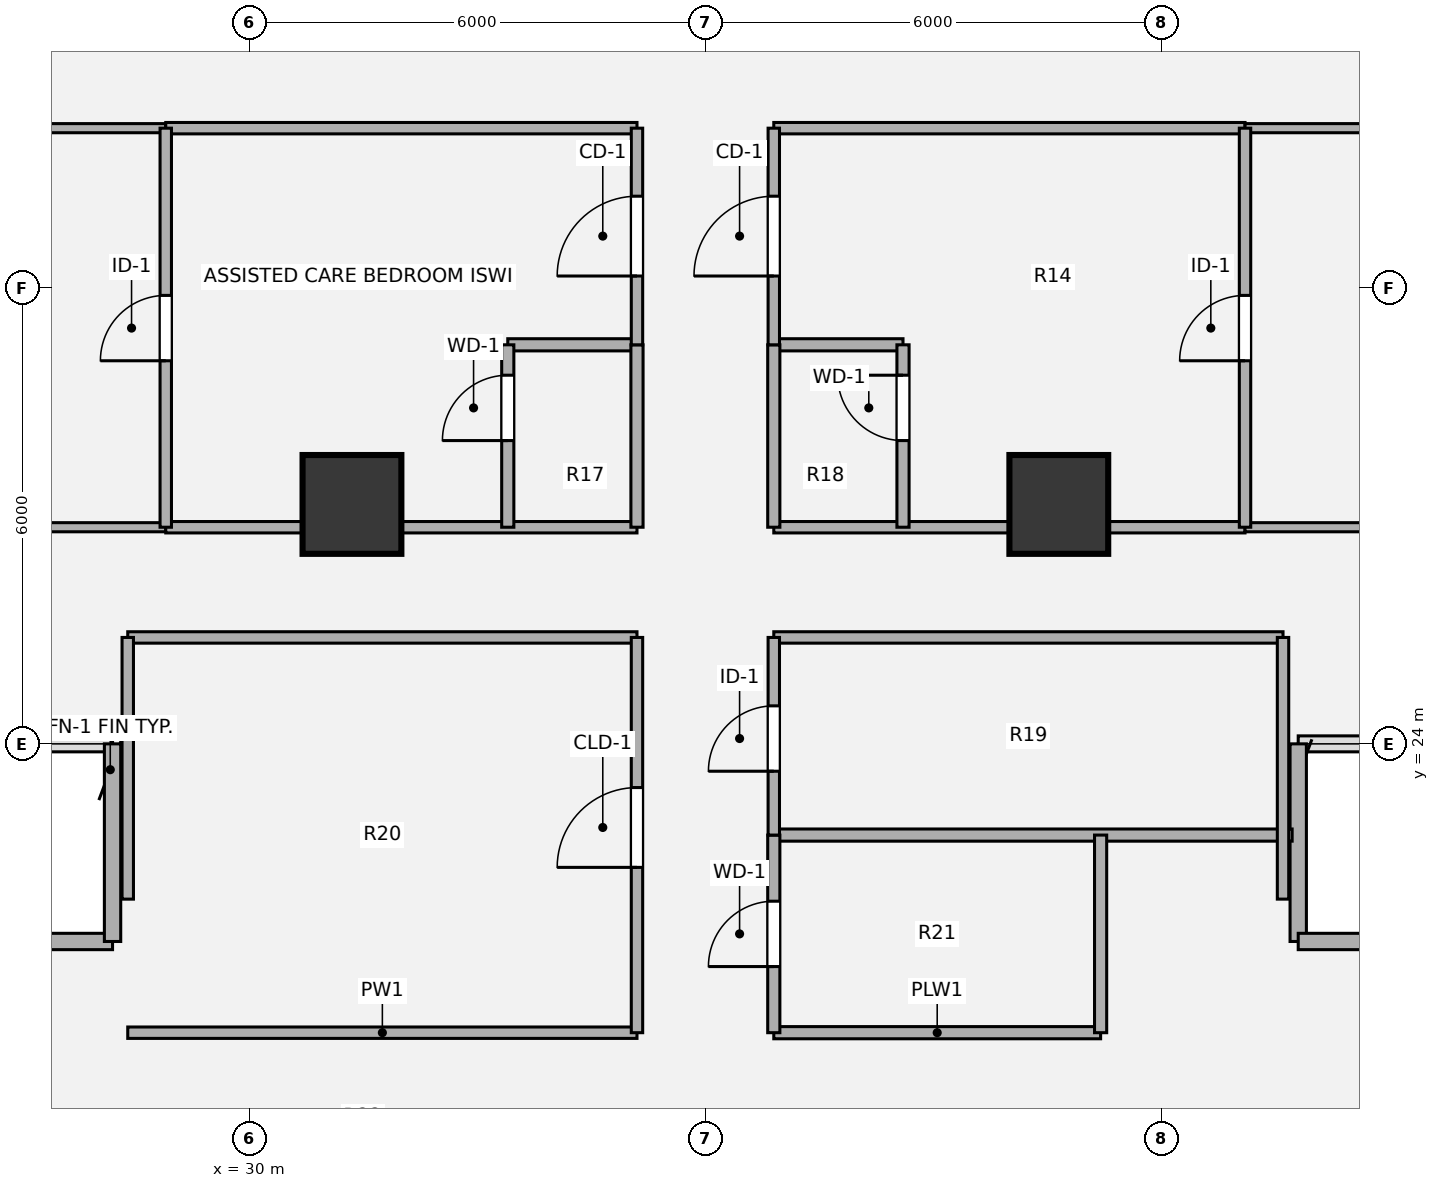
"""IFC4 building model, lengths in metres.
Left out: names, types, materials, properties, quantities, classifications, styles, units other than length and angle.
Written with IfcOpenShell. Run it as: python <this file> out.ifc"""

import sys

from ifc_helpers import new_model, si_unit, direction, frame, frame_2d, origin, origin_2d, place, context, subcontext, project, spatial, rectangle, hollow_circle, extrude, source, transform, mapped, element, fill, save


model = new_model("IFC4")
c1 = context("Model", 3, precision=1e-05, world=origin(), true_north=direction((0.0, 1.0)))
c2 = subcontext(c1, "Body", "Model", "MODEL_VIEW")
j1 = project(units=[si_unit("LENGTHUNIT", "METRE"), si_unit("PLANEANGLEUNIT", "RADIAN")], contexts=[c1])
p1 = place(None, origin())
s1 = spatial("IfcSite", under=j1, at=p1, CompositionType="ELEMENT")
p2 = place(p1, origin())
s2 = spatial("IfcBuilding", under=s1, at=p2, CompositionType="ELEMENT")
p3 = place(p2, frame((0.0, 0.0, 97.38)))
s3 = spatial("IfcBuildingStorey", under=s2, at=p3, CompositionType="ELEMENT", Elevation=97.38)
m1 = source(origin(), c2, "Body", "SweptSolid", [
    extrude(hollow_circle(Radius=0.65, WallThickness=0.045, at=origin_2d()), origin(), (0.0, 0.0, 1.0), 3.78),
])
for number, where, z_axis, x_axis in (
    (1, (31.35, 27.15, 0.0), (0.0, 0.0, 1.0), (1.0, 0.0, 0.0)),
    (2, (40.65, 27.15, 0.0), (0.0, 0.0, 1.0), (1.0, 0.0, 0.0)),
):
    element("IfcColumn", number, at=place(p3, frame(where, z_axis=z_axis, x_axis=x_axis)), inside=s3, PredefinedType="COLUMN", context=c2, shape_type="MappedRepresentation", body=[
        mapped(m1, transform((0.0, 0.0, 0.0), x_axis=(1.0, 0.0, 0.0), y_axis=(0.0, 1.0, 0.0), z_axis=(0.0, 0.0, 1.0), scale=1.0)),
    ])
p4 = place(p3, frame((24.35, 21.4, 0.0), z_axis=(0.0, 0.0, 1.0), x_axis=(1.0, 0.0, 0.0)))
e3 = element("IfcWall", 3, at=p4, inside=s3, PredefinedType="SOLIDWALL", context=c2, shape_type="SweptSolid", body=[
    extrude(rectangle(XDim=3.85, YDim=0.215, at=frame_2d((1.925, 0.0))), origin(), (0.0, 0.0, 1.0), 3.53),
])
for number, where, z_axis, x_axis in (
    (4, (28.2, 21.4, 0.0), (0.0, 0.0, 1.0), (0.0, 1.0, 0.0)),
    (5, (43.8, 24.0, 0.0), (0.0, 0.0, 1.0), (0.0, -1.0, 0.0)),
):
    element("IfcWall", number, at=place(p3, frame(where, z_axis=z_axis, x_axis=x_axis)), inside=s3, PredefinedType="SOLIDWALL", context=c2, shape_type="SweptSolid", body=[
        extrude(rectangle(XDim=2.6, YDim=0.215, at=frame_2d((1.3, 0.0))), origin(), (0.0, 0.0, 1.0), 3.53),
    ])
p5 = place(p3, frame((43.8, 21.4, 0.0), z_axis=(0.0, 0.0, 1.0), x_axis=(1.0, 0.0, 0.0)))
e6 = element("IfcWall", 6, at=p5, inside=s3, PredefinedType="SOLIDWALL", context=c2, shape_type="SweptSolid", body=[
    extrude(rectangle(XDim=3.85, YDim=0.215, at=frame_2d((1.925, 0.0))), origin(), (0.0, 0.0, 1.0), 3.53),
])
p6 = place(p3, frame((28.4, 20.2, 0.0), z_axis=(0.0, 0.0, 1.0), x_axis=(1.0, 0.0, 0.0)))
e7 = element("IfcWall", 7, at=p6, inside=s3, PredefinedType="PARTITIONING", context=c2, shape_type="SweptSolid", body=[
    extrude(rectangle(XDim=6.7, YDim=0.15, at=frame_2d((3.35, 0.0))), origin(), (0.0, 0.0, 1.0), 3.5),
])
p7 = place(p3, frame((36.9, 20.2, 0.0), z_axis=(0.0, 0.0, 1.0), x_axis=(1.0, 0.0, 0.0)))
e8 = element("IfcWall", 8, at=p7, inside=s3, PredefinedType="PLUMBINGWALL", context=c2, shape_type="SweptSolid", body=[
    extrude(rectangle(XDim=4.3, YDim=0.16, at=frame_2d((2.15, 0.0))), origin(), (0.0, 0.0, 1.0), 3.5),
])
p8 = place(p3, frame((36.9, 22.8, 0.0), z_axis=(0.0, 0.0, 1.0), x_axis=(1.0, 0.0, 0.0)))
e9 = element("IfcWall", 9, at=p8, inside=s3, PredefinedType="PLUMBINGWALL", context=c2, shape_type="SweptSolid", body=[
    extrude(rectangle(XDim=6.82, YDim=0.16, at=frame_2d((3.41, 0.0))), origin(), (0.0, 0.0, 1.0), 3.5),
])
for number, where, z_axis, x_axis in (
    (10, (28.4, 25.4, 0.0), (0.0, 0.0, 1.0), (1.0, 0.0, 0.0)),
    (11, (36.9, 25.4, 0.0), (0.0, 0.0, 1.0), (1.0, 0.0, 0.0)),
):
    element("IfcWall", number, at=place(p3, frame(where, z_axis=z_axis, x_axis=x_axis)), inside=s3, PredefinedType="PARTITIONING", context=c2, shape_type="SweptSolid", body=[
        extrude(rectangle(XDim=6.7, YDim=0.15, at=frame_2d((3.35, 0.0))), origin(), (0.0, 0.0, 1.0), 3.5),
    ])
p9 = place(p3, frame((24.0, 26.85, 0.0), z_axis=(0.0, 0.0, 1.0), x_axis=(1.0, 0.0, 0.0)))
e12 = element("IfcWall", 12, at=p9, inside=s3, PredefinedType="PARTITIONING", context=c2, shape_type="SweptSolid", body=[
    extrude(rectangle(XDim=4.9, YDim=0.12, at=frame_2d((2.45, 0.0))), origin(), (0.0, 0.0, 1.0), 3.055),
])
for number, where, z_axis, x_axis in (
    (13, (28.9, 26.85, 0.0), (0.0, 0.0, 1.0), (1.0, 0.0, 0.0)),
    (14, (36.9, 26.85, 0.0), (0.0, 0.0, 1.0), (1.0, 0.0, 0.0)),
):
    element("IfcWall", number, at=place(p3, frame(where, z_axis=z_axis, x_axis=x_axis)), inside=s3, PredefinedType="PARTITIONING", context=c2, shape_type="SweptSolid", body=[
        extrude(rectangle(XDim=6.2, YDim=0.15, at=frame_2d((3.1, 0.0))), origin(), (0.0, 0.0, 1.0), 2.903),
    ])
p10 = place(p3, frame((43.1, 26.85, 0.0), z_axis=(0.0, 0.0, 1.0), x_axis=(1.0, 0.0, 0.0)))
e15 = element("IfcWall", 15, at=p10, inside=s3, PredefinedType="PARTITIONING", context=c2, shape_type="SweptSolid", body=[
    extrude(rectangle(XDim=4.9, YDim=0.12, at=frame_2d((2.45, 0.0))), origin(), (0.0, 0.0, 1.0), 3.055),
])
for number, where, z_axis, x_axis in (
    (16, (33.4, 29.25, 0.0), (0.0, 0.0, 1.0), (1.0, 0.0, 0.0)),
    (17, (36.9, 29.25, 0.0), (0.0, 0.0, 1.0), (1.0, 0.0, 0.0)),
):
    element("IfcWall", number, at=place(p3, frame(where, z_axis=z_axis, x_axis=x_axis)), inside=s3, PredefinedType="PLUMBINGWALL", context=c2, shape_type="SweptSolid", body=[
        extrude(rectangle(XDim=1.7, YDim=0.16, at=frame_2d((0.85, 0.0))), origin(), (0.0, 0.0, 1.0), 3.259),
    ])
p11 = place(p3, frame((24.0, 32.1, 0.0), z_axis=(0.0, 0.0, 1.0), x_axis=(1.0, 0.0, 0.0)))
e18 = element("IfcWall", 18, at=p11, inside=s3, PredefinedType="PARTITIONING", context=c2, shape_type="SweptSolid", body=[
    extrude(rectangle(XDim=4.9, YDim=0.12, at=frame_2d((2.45, 0.0))), origin(), (0.0, 0.0, 1.0), 2.982),
])
for number, where, z_axis, x_axis in (
    (19, (28.9, 32.1, 0.0), (0.0, 0.0, 1.0), (1.0, 0.0, 0.0)),
    (20, (36.9, 32.1, 0.0), (0.0, 0.0, 1.0), (1.0, 0.0, 0.0)),
):
    element("IfcWall", number, at=place(p3, frame(where, z_axis=z_axis, x_axis=x_axis)), inside=s3, PredefinedType="PARTITIONING", context=c2, shape_type="SweptSolid", body=[
        extrude(rectangle(XDim=6.2, YDim=0.15, at=frame_2d((3.1, 0.0))), origin(), (0.0, 0.0, 1.0), 2.982),
    ])
p12 = place(p3, frame((43.1, 32.1, 0.0), z_axis=(0.0, 0.0, 1.0), x_axis=(1.0, 0.0, 0.0)))
e21 = element("IfcWall", 21, at=p12, inside=s3, PredefinedType="PARTITIONING", context=c2, shape_type="SweptSolid", body=[
    extrude(rectangle(XDim=4.9, YDim=0.12, at=frame_2d((2.45, 0.0))), origin(), (0.0, 0.0, 1.0), 2.982),
])
p13 = place(p3, frame((28.4, 21.957, 0.0), z_axis=(0.0, 0.0, 1.0), x_axis=(0.0, 1.0, 0.0)))
e22 = element("IfcWall", 22, at=p13, inside=s3, PredefinedType="PARTITIONING", context=c2, shape_type="SweptSolid", body=[
    extrude(rectangle(XDim=3.443, YDim=0.15, at=frame_2d((1.721, 0.0))), origin(), (0.0, 0.0, 1.0), 3.5),
])
p14 = place(p3, frame((28.9, 26.85, 0.0), z_axis=(0.0, 0.0, 1.0), x_axis=(0.0, 1.0, 0.0)))
e23 = element("IfcWall", 23, at=p14, inside=s3, PredefinedType="PARTITIONING", context=c2, shape_type="SweptSolid", body=[
    extrude(rectangle(XDim=5.25, YDim=0.15, at=frame_2d((2.625, 0.0))), origin(), (0.0, 0.0, 1.0), 3.5),
])
p15 = place(p14, frame((2.19, 0.0, 0.0)))
e24 = element("IfcOpeningElement", 24, at=p15, cuts=e23, PredefinedType="OPENING", context=c2, shape_type="SweptSolid", body=[
    extrude(rectangle(XDim=0.86, YDim=2.1, at=origin_2d()), frame((0.43, 0.085, 1.05), z_axis=(0.0, -1.0, 0.0), x_axis=(1.0, 0.0, 0.0)), (0.0, 0.0, 1.0), 0.17),
])
p16 = place(p3, frame((33.4, 26.85, 0.0), z_axis=(0.0, 0.0, 1.0), x_axis=(0.0, 1.0, 0.0)))
e25 = element("IfcWall", 25, at=p16, inside=s3, PredefinedType="PLUMBINGWALL", context=c2, shape_type="SweptSolid", body=[
    extrude(rectangle(XDim=2.4, YDim=0.16, at=frame_2d((1.2, 0.0))), origin(), (0.0, 0.0, 1.0), 3.5),
])
p17 = place(p16, frame((1.14, 0.0, 0.0)))
e26 = element("IfcOpeningElement", 26, at=p17, cuts=e25, PredefinedType="OPENING", context=c2, shape_type="SweptSolid", body=[
    extrude(rectangle(XDim=0.86, YDim=2.1, at=origin_2d()), frame((0.43, 0.09, 1.05), z_axis=(0.0, -1.0, 0.0), x_axis=(1.0, 0.0, 0.0)), (0.0, 0.0, 1.0), 0.18),
])
p18 = place(p3, frame((35.1, 20.2, 0.0), z_axis=(0.0, 0.0, 1.0), x_axis=(0.0, 1.0, 0.0)))
e27 = element("IfcWall", 27, at=p18, inside=s3, PredefinedType="PARTITIONING", context=c2, shape_type="SweptSolid", body=[
    extrude(rectangle(XDim=5.2, YDim=0.15, at=frame_2d((2.6, 0.0))), origin(), (0.0, 0.0, 1.0), 3.5),
])
p19 = place(p18, frame((2.175, 0.0, 0.0)))
e28 = element("IfcOpeningElement", 28, at=p19, cuts=e27, PredefinedType="OPENING", context=c2, shape_type="SweptSolid", body=[
    extrude(rectangle(XDim=1.05, YDim=2.1, at=origin_2d()), frame((0.525, 0.085, 1.05), z_axis=(0.0, -1.0, 0.0), x_axis=(1.0, 0.0, 0.0)), (0.0, 0.0, 1.0), 0.17),
])
p20 = place(p3, frame((35.1, 26.85, 0.0), z_axis=(0.0, 0.0, 1.0), x_axis=(0.0, 1.0, 0.0)))
e29 = element("IfcWall", 29, at=p20, inside=s3, PredefinedType="PLUMBINGWALL", context=c2, shape_type="SweptSolid", body=[
    extrude(rectangle(XDim=2.4, YDim=0.16, at=frame_2d((1.2, 0.0))), origin(), (0.0, 0.0, 1.0), 3.5),
])
p21 = place(p3, frame((35.1, 29.25, 0.0), z_axis=(0.0, 0.0, 1.0), x_axis=(0.0, 1.0, 0.0)))
e30 = element("IfcWall", 30, at=p21, inside=s3, PredefinedType="PARTITIONING", context=c2, shape_type="SweptSolid", body=[
    extrude(rectangle(XDim=2.85, YDim=0.15, at=frame_2d((1.425, 0.0))), origin(), (0.0, 0.0, 1.0), 3.5),
])
p22 = place(p21, frame((0.905, 0.0, 0.0)))
e31 = element("IfcOpeningElement", 31, at=p22, cuts=e30, PredefinedType="OPENING", context=c2, shape_type="SweptSolid", body=[
    extrude(rectangle(XDim=1.05, YDim=2.1, at=origin_2d()), frame((0.525, 0.085, 1.05), z_axis=(0.0, -1.0, 0.0), x_axis=(1.0, 0.0, 0.0)), (0.0, 0.0, 1.0), 0.17),
])
p23 = place(p3, frame((36.9, 20.2, 0.0), z_axis=(0.0, 0.0, 1.0), x_axis=(0.0, 1.0, 0.0)))
e32 = element("IfcWall", 32, at=p23, inside=s3, PredefinedType="PLUMBINGWALL", context=c2, shape_type="SweptSolid", body=[
    extrude(rectangle(XDim=2.6, YDim=0.16, at=frame_2d((1.3, 0.0))), origin(), (0.0, 0.0, 1.0), 3.5),
])
p24 = place(p23, frame((0.87, 0.0, 0.0)))
e33 = element("IfcOpeningElement", 33, at=p24, cuts=e32, PredefinedType="OPENING", context=c2, shape_type="SweptSolid", body=[
    extrude(rectangle(XDim=0.86, YDim=2.1, at=origin_2d()), frame((0.43, 0.09, 1.05), z_axis=(0.0, -1.0, 0.0), x_axis=(1.0, 0.0, 0.0)), (0.0, 0.0, 1.0), 0.18),
])
p25 = place(p3, frame((36.9, 22.8, 0.0), z_axis=(0.0, 0.0, 1.0), x_axis=(0.0, 1.0, 0.0)))
e34 = element("IfcWall", 34, at=p25, inside=s3, PredefinedType="PARTITIONING", context=c2, shape_type="SweptSolid", body=[
    extrude(rectangle(XDim=2.6, YDim=0.15, at=frame_2d((1.3, 0.0))), origin(), (0.0, 0.0, 1.0), 3.5),
])
p26 = place(p25, frame((0.84, 0.0, 0.0)))
e35 = element("IfcOpeningElement", 35, at=p26, cuts=e34, PredefinedType="OPENING", context=c2, shape_type="SweptSolid", body=[
    extrude(rectangle(XDim=0.86, YDim=2.1, at=origin_2d()), frame((0.43, 0.085, 1.05), z_axis=(0.0, -1.0, 0.0), x_axis=(1.0, 0.0, 0.0)), (0.0, 0.0, 1.0), 0.17),
])
p27 = place(p3, frame((36.9, 26.85, 0.0), z_axis=(0.0, 0.0, 1.0), x_axis=(0.0, 1.0, 0.0)))
e36 = element("IfcWall", 36, at=p27, inside=s3, PredefinedType="PLUMBINGWALL", context=c2, shape_type="SweptSolid", body=[
    extrude(rectangle(XDim=2.4, YDim=0.16, at=frame_2d((1.2, 0.0))), origin(), (0.0, 0.0, 1.0), 3.5),
])
p28 = place(p3, frame((36.9, 29.25, 0.0), z_axis=(0.0, 0.0, 1.0), x_axis=(0.0, 1.0, 0.0)))
e37 = element("IfcWall", 37, at=p28, inside=s3, PredefinedType="PARTITIONING", context=c2, shape_type="SweptSolid", body=[
    extrude(rectangle(XDim=2.85, YDim=0.15, at=frame_2d((1.425, 0.0))), origin(), (0.0, 0.0, 1.0), 3.5),
])
p29 = place(p28, frame((0.905, 0.0, 0.0)))
e38 = element("IfcOpeningElement", 38, at=p29, cuts=e37, PredefinedType="OPENING", context=c2, shape_type="SweptSolid", body=[
    extrude(rectangle(XDim=1.05, YDim=2.1, at=origin_2d()), frame((0.525, 0.085, 1.05), z_axis=(0.0, -1.0, 0.0), x_axis=(1.0, 0.0, 0.0)), (0.0, 0.0, 1.0), 0.17),
])
p30 = place(p3, frame((38.6, 26.85, 0.0), z_axis=(0.0, 0.0, 1.0), x_axis=(0.0, 1.0, 0.0)))
e39 = element("IfcWall", 39, at=p30, inside=s3, PredefinedType="PLUMBINGWALL", context=c2, shape_type="SweptSolid", body=[
    extrude(rectangle(XDim=2.4, YDim=0.16, at=frame_2d((1.2, 0.0))), origin(), (0.0, 0.0, 1.0), 3.5),
])
p31 = place(p30, frame((1.14, 0.0, 0.0)))
e40 = element("IfcOpeningElement", 40, at=p31, cuts=e39, PredefinedType="OPENING", context=c2, shape_type="SweptSolid", body=[
    extrude(rectangle(XDim=0.86, YDim=2.1, at=origin_2d()), frame((0.43, 0.09, 1.05), z_axis=(0.0, -1.0, 0.0), x_axis=(1.0, 0.0, 0.0)), (0.0, 0.0, 1.0), 0.18),
])
p32 = place(p3, frame((41.2, 20.2, 0.0), z_axis=(0.0, 0.0, 1.0), x_axis=(0.0, 1.0, 0.0)))
e41 = element("IfcWall", 41, at=p32, inside=s3, PredefinedType="PLUMBINGWALL", context=c2, shape_type="SweptSolid", body=[
    extrude(rectangle(XDim=2.6, YDim=0.16, at=frame_2d((1.3, 0.0))), origin(), (0.0, 0.0, 1.0), 2.815),
])
p33 = place(p3, frame((43.1, 26.85, 0.0), z_axis=(0.0, 0.0, 1.0), x_axis=(0.0, 1.0, 0.0)))
e42 = element("IfcWall", 42, at=p33, inside=s3, PredefinedType="PARTITIONING", context=c2, shape_type="SweptSolid", body=[
    extrude(rectangle(XDim=5.25, YDim=0.15, at=frame_2d((2.625, 0.0))), origin(), (0.0, 0.0, 1.0), 3.5),
])
p34 = place(p33, frame((2.19, 0.0, 0.0)))
e43 = element("IfcOpeningElement", 43, at=p34, cuts=e42, PredefinedType="OPENING", context=c2, shape_type="SweptSolid", body=[
    extrude(rectangle(XDim=0.86, YDim=2.1, at=origin_2d()), frame((0.43, 0.085, 1.05), z_axis=(0.0, -1.0, 0.0), x_axis=(1.0, 0.0, 0.0)), (0.0, 0.0, 1.0), 0.17),
])
p35 = place(p3, frame((43.6, 21.958, 0.0), z_axis=(0.0, 0.0, 1.0), x_axis=(0.0, 1.0, 0.0)))
e44 = element("IfcWall", 44, at=p35, inside=s3, PredefinedType="PARTITIONING", context=c2, shape_type="SweptSolid", body=[
    extrude(rectangle(XDim=3.442, YDim=0.15, at=frame_2d((1.721, 0.0))), origin(), (0.0, 0.0, 1.0), 3.5),
])
m2 = source(origin(), c2, "Body", "SweptSolid", [
    extrude(rectangle(XDim=0.86, YDim=2.1, at=origin_2d()), frame((0.43, 0.025, 1.05), z_axis=(0.0, -1.0, 0.0), x_axis=(1.0, 0.0, 0.0)), (0.0, 0.0, 1.0), 0.05),
])
p36 = place(p15, origin())
e45 = element("IfcDoor", 45, at=p36, inside=s3, OperationType="SINGLE_SWING_LEFT", PredefinedType="DOOR", context=c2, shape_type="MappedRepresentation", body=[
    mapped(m2, transform((0.0, 0.0, 0.0), x_axis=(1.0, 0.0, 0.0), y_axis=(0.0, 1.0, 0.0), z_axis=(0.0, 0.0, 1.0), scale=1.0)),
])
fill(e24, e45)
m3 = source(origin(), c2, "Body", "SweptSolid", [
    extrude(rectangle(XDim=0.86, YDim=2.1, at=origin_2d()), frame((0.43, 0.025, 1.05), z_axis=(0.0, -1.0, 0.0), x_axis=(1.0, 0.0, 0.0)), (0.0, 0.0, 1.0), 0.05),
])
p37 = place(p17, origin())
e46 = element("IfcDoor", 46, at=p37, inside=s3, OperationType="SINGLE_SWING_LEFT", PredefinedType="DOOR", context=c2, shape_type="MappedRepresentation", body=[
    mapped(m3, transform((0.0, 0.0, 0.0), x_axis=(1.0, 0.0, 0.0), y_axis=(0.0, 1.0, 0.0), z_axis=(0.0, 0.0, 1.0), scale=1.0)),
])
fill(e26, e46)
m4 = source(origin(), c2, "Body", "SweptSolid", [
    extrude(rectangle(XDim=1.05, YDim=2.1, at=origin_2d()), frame((0.525, 0.025, 1.05), z_axis=(0.0, -1.0, 0.0), x_axis=(1.0, 0.0, 0.0)), (0.0, 0.0, 1.0), 0.05),
])
p38 = place(p19, origin())
e47 = element("IfcDoor", 47, at=p38, inside=s3, OperationType="SINGLE_SWING_LEFT", PredefinedType="DOOR", context=c2, shape_type="MappedRepresentation", body=[
    mapped(m4, transform((0.0, 0.0, 0.0), x_axis=(1.0, 0.0, 0.0), y_axis=(0.0, 1.0, 0.0), z_axis=(0.0, 0.0, 1.0), scale=1.0)),
])
fill(e28, e47)
m5 = source(origin(), c2, "Body", "SweptSolid", [
    extrude(rectangle(XDim=1.05, YDim=2.1, at=origin_2d()), frame((0.525, 0.025, 1.05), z_axis=(0.0, -1.0, 0.0), x_axis=(1.0, 0.0, 0.0)), (0.0, 0.0, 1.0), 0.05),
])
p39 = place(p22, origin())
e48 = element("IfcDoor", 48, at=p39, inside=s3, OperationType="SINGLE_SWING_LEFT", PredefinedType="DOOR", context=c2, shape_type="MappedRepresentation", body=[
    mapped(m5, transform((0.0, 0.0, 0.0), x_axis=(1.0, 0.0, 0.0), y_axis=(0.0, 1.0, 0.0), z_axis=(0.0, 0.0, 1.0), scale=1.0)),
])
fill(e31, e48)
p40 = place(p24, origin())
e49 = element("IfcDoor", 49, at=p40, inside=s3, OperationType="SINGLE_SWING_LEFT", PredefinedType="DOOR", context=c2, shape_type="MappedRepresentation", body=[
    mapped(m3, transform((0.0, 0.0, 0.0), x_axis=(1.0, 0.0, 0.0), y_axis=(0.0, 1.0, 0.0), z_axis=(0.0, 0.0, 1.0), scale=1.0)),
])
fill(e33, e49)
p41 = place(p26, origin())
e50 = element("IfcDoor", 50, at=p41, inside=s3, OperationType="SINGLE_SWING_LEFT", PredefinedType="DOOR", context=c2, shape_type="MappedRepresentation", body=[
    mapped(m2, transform((0.0, 0.0, 0.0), x_axis=(1.0, 0.0, 0.0), y_axis=(0.0, 1.0, 0.0), z_axis=(0.0, 0.0, 1.0), scale=1.0)),
])
fill(e35, e50)
p42 = place(p29, origin())
e51 = element("IfcDoor", 51, at=p42, inside=s3, OperationType="SINGLE_SWING_LEFT", PredefinedType="DOOR", context=c2, shape_type="MappedRepresentation", body=[
    mapped(m5, transform((0.0, 0.0, 0.0), x_axis=(1.0, 0.0, 0.0), y_axis=(0.0, 1.0, 0.0), z_axis=(0.0, 0.0, 1.0), scale=1.0)),
])
fill(e38, e51)
p43 = place(p31, origin())
e52 = element("IfcDoor", 52, at=p43, inside=s3, OperationType="SINGLE_SWING_RIGHT", PredefinedType="DOOR", context=c2, shape_type="MappedRepresentation", body=[
    mapped(m3, transform((0.0, 0.0, 0.0), x_axis=(1.0, 0.0, 0.0), y_axis=(0.0, 1.0, 0.0), z_axis=(0.0, 0.0, 1.0), scale=1.0)),
])
fill(e40, e52)
p44 = place(p34, origin())
e53 = element("IfcDoor", 53, at=p44, inside=s3, OperationType="SINGLE_SWING_LEFT", PredefinedType="DOOR", context=c2, shape_type="MappedRepresentation", body=[
    mapped(m2, transform((0.0, 0.0, 0.0), x_axis=(1.0, 0.0, 0.0), y_axis=(0.0, 1.0, 0.0), z_axis=(0.0, 0.0, 1.0), scale=1.0)),
])
fill(e43, e53)
save(model, sys.argv[1])
